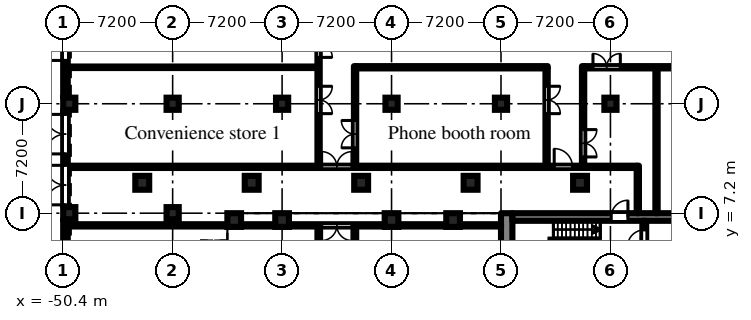
"""IFC4 building model, lengths in metres.
Left out: names, types, materials, properties, quantities, classifications, styles, units other than length and angle.
Written with IfcOpenShell. Run it as: python <this file> out.ifc"""

import sys

from ifc_helpers import new_model, si_unit, direction, frame, frame_2d, origin, origin_2d, place, context, subcontext, project, spatial, rectangle, hollow_circle, extrude, element, fill, save


model = new_model("IFC4")
c1 = context("Model", 3, precision=1e-05, world=origin(), true_north=direction((0.0, 1.0)))
c2 = subcontext(c1, "Body", "Model", "MODEL_VIEW")
j1 = project(units=[si_unit("LENGTHUNIT", "METRE"), si_unit("PLANEANGLEUNIT", "RADIAN")], contexts=[c1])
p1 = place(None, origin())
s1 = spatial("IfcSite", under=j1, at=p1, CompositionType="ELEMENT")
p2 = place(p1, origin())
s2 = spatial("IfcBuilding", under=s1, at=p2, CompositionType="ELEMENT")
p3 = place(p2, origin())
s3 = spatial("IfcBuildingStorey", under=s2, at=p3, CompositionType="ELEMENT", Elevation=0.0)
for number, where, z_axis, x_axis in (
    (1, (-39.15, 6.75, 0.0), (0.0, 0.0, 1.0), (1.0, 0.0, 0.0)),
    (2, (-36.0, 6.75, 0.0), (0.0, 0.0, 1.0), (1.0, 0.0, 0.0)),
    (3, (-28.8, 6.75, 0.0), (0.0, 0.0, 1.0), (1.0, 0.0, 0.0)),
    (4, (-24.75, 6.75, 0.0), (0.0, 0.0, 1.0), (1.0, 0.0, 0.0)),
):
    element("IfcColumn", number, at=place(p3, frame(where, z_axis=z_axis, x_axis=x_axis)), inside=s3, PredefinedType="COLUMN", context=c2, shape_type="SweptSolid", body=[
        extrude(rectangle(XDim=0.9, YDim=0.9, at=origin_2d()), origin(), (0.0, 0.0, 1.0), 7.2),
    ])
for number, where, z_axis, x_axis in (
    (5, (-50.0, 7.2, 0.0), (0.0, 0.0, 1.0), (1.0, 0.0, 0.0)),
    (6, (-50.0, 14.4, 0.0), (0.0, 0.0, 1.0), (1.0, 0.0, 0.0)),
    (7, (-43.2, 7.2, 0.0), (0.0, 0.0, 1.0), (1.0, 0.0, 0.0)),
    (8, (-43.2, 14.4, 0.0), (0.0, 0.0, 1.0), (1.0, 0.0, 0.0)),
    (9, (-36.0, 14.4, 0.0), (0.0, 0.0, 1.0), (1.0, 0.0, 0.0)),
    (10, (-28.8, 14.4, 0.0), (0.0, 0.0, 1.0), (1.0, 0.0, 0.0)),
    (11, (-21.6, 14.4, 0.0), (0.0, 0.0, 1.0), (1.0, 0.0, 0.0)),
    (12, (-14.4, 14.4, 0.0), (0.0, 0.0, 1.0), (1.0, 0.0, 0.0)),
):
    element("IfcColumn", number, at=place(p3, frame(where, z_axis=z_axis, x_axis=x_axis)), inside=s3, PredefinedType="COLUMN", context=c2, shape_type="SweptSolid", body=[
        extrude(rectangle(XDim=0.8, YDim=0.8, at=origin_2d()), origin(), (0.0, 0.0, 1.0), 6.6),
    ])
for number, where, z_axis, x_axis in (
    (13, (-16.4, 9.2, 0.0), (0.0, 0.0, 1.0), (1.0, 0.0, 0.0)),
    (14, (-23.6, 9.2, 0.0), (0.0, 0.0, 1.0), (1.0, 0.0, 0.0)),
    (15, (-30.8, 9.2, 0.0), (0.0, 0.0, 1.0), (1.0, 0.0, 0.0)),
    (16, (-38.0, 9.2, 0.0), (0.0, 0.0, 1.0), (1.0, 0.0, 0.0)),
    (17, (-45.2, 9.2, 0.0), (0.0, 0.0, 1.0), (1.0, 0.0, 0.0)),
):
    element("IfcColumn", number, at=place(p3, frame(where, z_axis=z_axis, x_axis=x_axis)), inside=s3, PredefinedType="COLUMN", context=c2, shape_type="SweptSolid", body=[
        extrude(hollow_circle(Radius=0.457, WallThickness=0.05, at=origin_2d()), origin(), (0.0, 0.0, 1.0), 7.5),
    ])
p4 = place(p3, frame((-50.25, 21.2, 0.0), z_axis=(0.0, 0.0, 1.0), x_axis=(0.0, -1.0, 0.0)))
e18 = element("IfcWall", 18, at=p4, inside=s3, PredefinedType="SOLIDWALL", context=c2, shape_type="SweptSolid", body=[
    extrude(rectangle(XDim=6.4, YDim=0.3, at=frame_2d((3.2, 0.0))), origin(), (0.0, 0.0, 1.0), 6.6),
])
p5 = place(p4, frame((1.35, 0.0, 0.0)))
e19 = element("IfcOpeningElement", 19, at=p5, cuts=e18, PredefinedType="OPENING", context=c2, shape_type="SweptSolid", body=[
    extrude(rectangle(XDim=2.6, YDim=2.4, at=frame_2d((1.3, 1.2))), frame((0.0, 0.16, 0.0), z_axis=(0.0, -1.0, 0.0), x_axis=(1.0, 0.0, 0.0)), (0.0, 0.0, 1.0), 0.32),
])
p6 = place(p3, frame((-50.25, 14.0, 0.0), z_axis=(0.0, 0.0, 1.0), x_axis=(0.0, -1.0, 0.0)))
e20 = element("IfcWall", 20, at=p6, inside=s3, PredefinedType="SOLIDWALL", context=c2, shape_type="SweptSolid", body=[
    extrude(rectangle(XDim=6.4, YDim=0.3, at=frame_2d((3.2, 0.0))), origin(), (0.0, 0.0, 1.0), 6.6),
])
p7 = place(p6, frame((0.3, 0.0, 0.0)))
e21 = element("IfcOpeningElement", 21, at=p7, cuts=e20, PredefinedType="OPENING", context=c2, shape_type="SweptSolid", body=[
    extrude(rectangle(XDim=2.6, YDim=2.4, at=frame_2d((1.3, 1.2))), frame((0.0, 0.16, 0.0), z_axis=(0.0, -1.0, 0.0), x_axis=(1.0, 0.0, 0.0)), (0.0, 0.0, 1.0), 0.32),
])
p8 = place(p6, frame((3.65, 0.0, 0.0)))
e22 = element("IfcOpeningElement", 22, at=p8, cuts=e20, PredefinedType="OPENING", context=c2, shape_type="SweptSolid", body=[
    extrude(rectangle(XDim=2.6, YDim=2.4, at=frame_2d((1.3, 1.2))), frame((0.0, 0.16, 0.0), z_axis=(0.0, -1.0, 0.0), x_axis=(1.0, 0.0, 0.0)), (0.0, 0.0, 1.0), 0.32),
])
p9 = place(p3, frame((-50.25, 6.8, 0.0), z_axis=(0.0, 0.0, 1.0), x_axis=(0.0, -1.0, 0.0)))
e23 = element("IfcWall", 23, at=p9, inside=s3, PredefinedType="SOLIDWALL", context=c2, shape_type="SweptSolid", body=[
    extrude(rectangle(XDim=6.4, YDim=0.3, at=frame_2d((3.2, 0.0))), origin(), (0.0, 0.0, 1.0), 6.6),
])
p10 = place(p9, frame((3.35, 0.0, 0.0)))
e24 = element("IfcOpeningElement", 24, at=p10, cuts=e23, PredefinedType="OPENING", context=c2, shape_type="SweptSolid", body=[
    extrude(rectangle(XDim=2.6, YDim=2.4, at=frame_2d((1.3, 1.2))), frame((0.0, 0.16, 0.0), z_axis=(0.0, -1.0, 0.0), x_axis=(1.0, 0.0, 0.0)), (0.0, 0.0, 1.0), 0.32),
])
p11 = place(p3, frame((-21.225, -7.2, 0.0), z_axis=(0.0, 0.0, 1.0), x_axis=(0.0, 1.0, 0.0)))
e25 = element("IfcWall", 25, at=p11, inside=s3, PredefinedType="SHEAR", context=c2, shape_type="SweptSolid", body=[
    extrude(rectangle(XDim=14.4, YDim=0.75, at=frame_2d((7.2, 0.0))), origin(), (0.0, 0.0, 1.0), 6.6),
])
p12 = place(p11, frame((6.0, 0.0, 0.0)))
e26 = element("IfcOpeningElement", 26, at=p12, cuts=e25, PredefinedType="OPENING", context=c2, shape_type="SweptSolid", body=[
    extrude(rectangle(XDim=2.4, YDim=2.2, at=frame_2d((1.2, 1.1))), frame((0.0, 0.385, 0.0), z_axis=(0.0, -1.0, 0.0), x_axis=(1.0, 0.0, 0.0)), (0.0, 0.0, 1.0), 0.77),
])
p13 = place(p3, frame((-7.9, 6.95, 0.0), z_axis=(0.0, 0.0, 1.0), x_axis=(-1.0, 0.0, 0.0)))
e27 = element("IfcWall", 27, at=p13, inside=s3, PredefinedType="SHEAR", context=c2, shape_type="SweptSolid", body=[
    extrude(rectangle(XDim=12.95, YDim=0.5, at=frame_2d((6.475, 0.0))), origin(), (0.0, 0.0, 1.0), 6.6),
])
p14 = place(p13, frame((5.35, 0.0, 0.0)))
e28 = element("IfcOpeningElement", 28, at=p14, cuts=e27, PredefinedType="OPENING", context=c2, shape_type="SweptSolid", body=[
    extrude(rectangle(XDim=1.1, YDim=2.1, at=frame_2d((0.55, 1.05))), frame((0.0, 0.26, 0.0), z_axis=(0.0, -1.0, 0.0), x_axis=(1.0, 0.0, 0.0)), (0.0, 0.0, 1.0), 0.52),
])
p15 = place(p3, frame((-12.175, 2.05, 0.0), z_axis=(0.0, 0.0, 1.0), x_axis=(0.0, 1.0, 0.0)))
e29 = element("IfcWall", 29, at=p15, inside=s3, PredefinedType="SHEAR", context=c2, shape_type="SweptSolid", body=[
    extrude(rectangle(XDim=4.65, YDim=0.25, at=frame_2d((2.325, 0.0))), origin(), (0.0, 0.0, 1.0), 6.6),
])
p16 = place(p15, frame((2.95, 0.0, 0.0)))
e30 = element("IfcOpeningElement", 30, at=p16, cuts=e29, PredefinedType="OPENING", context=c2, shape_type="SweptSolid", body=[
    extrude(rectangle(XDim=1.1, YDim=2.1, at=frame_2d((0.55, 1.05))), frame((0.0, 0.135, 0.0), z_axis=(0.0, -1.0, 0.0), x_axis=(1.0, 0.0, 0.0)), (0.0, 0.0, 1.0), 0.27),
])
p17 = place(p3, frame((-50.22, 6.4, 0.0), z_axis=(0.0, 0.0, 1.0), x_axis=(1.0, 0.0, 0.0)))
e31 = element("IfcWall", 31, at=p17, inside=s3, PredefinedType="PARTITIONING", context=c2, shape_type="SweptSolid", body=[
    extrude(rectangle(XDim=28.62, YDim=0.15, at=frame_2d((14.31, 0.0))), origin(), (0.0, 0.0, 1.0), 6.6),
])
p18 = place(p17, frame((16.82, 0.0, 0.0)))
e32 = element("IfcOpeningElement", 32, at=p18, cuts=e31, PredefinedType="OPENING", context=c2, shape_type="SweptSolid", body=[
    extrude(rectangle(XDim=2.0, YDim=2.1, at=frame_2d((1.0, 1.05))), frame((0.0, 0.085, 0.0), z_axis=(0.0, -1.0, 0.0), x_axis=(1.0, 0.0, 0.0)), (0.0, 0.0, 1.0), 0.17),
])
p19 = place(p3, frame((-50.22, 10.25, 0.0), z_axis=(0.0, 0.0, 1.0), x_axis=(1.0, 0.0, 0.0)))
e33 = element("IfcWall", 33, at=p19, inside=s3, PredefinedType="PARTITIONING", context=c2, shape_type="SweptSolid", body=[
    extrude(rectangle(XDim=37.545, YDim=0.15, at=frame_2d((18.772, 0.0))), origin(), (0.0, 0.0, 1.0), 6.6),
])
p20 = place(p19, frame((16.82, 0.0, 0.0)))
e34 = element("IfcOpeningElement", 34, at=p20, cuts=e33, PredefinedType="OPENING", context=c2, shape_type="SweptSolid", body=[
    extrude(rectangle(XDim=2.0, YDim=2.1, at=frame_2d((1.0, 1.05))), frame((0.0, 0.085, 0.0), z_axis=(0.0, -1.0, 0.0), x_axis=(1.0, 0.0, 0.0)), (0.0, 0.0, 1.0), 0.17),
])
p21 = place(p19, frame((32.12, 0.0, 0.0)))
e35 = element("IfcOpeningElement", 35, at=p21, cuts=e33, PredefinedType="OPENING", context=c2, shape_type="SweptSolid", body=[
    extrude(rectangle(XDim=1.2, YDim=2.1, at=frame_2d((0.6, 1.05))), frame((0.0, 0.085, 0.0), z_axis=(0.0, -1.0, 0.0), x_axis=(1.0, 0.0, 0.0)), (0.0, 0.0, 1.0), 0.17),
])
p22 = place(p3, frame((-50.22, 16.8, 0.0), z_axis=(0.0, 0.0, 1.0), x_axis=(1.0, 0.0, 0.0)))
e36 = element("IfcWall", 36, at=p22, inside=s3, PredefinedType="PARTITIONING", context=c2, shape_type="SweptSolid", body=[
    extrude(rectangle(XDim=16.545, YDim=0.1, at=frame_2d((8.272, 0.0))), origin(), (0.0, 0.0, 1.0), 6.6),
])
p23 = place(p3, frame((-33.6, 1.5, 0.0), z_axis=(0.0, 0.0, 1.0), x_axis=(0.0, 1.0, 0.0)))
e37 = element("IfcWall", 37, at=p23, inside=s3, PredefinedType="PARTITIONING", context=c2, shape_type="SweptSolid", body=[
    extrude(rectangle(XDim=4.825, YDim=0.15, at=frame_2d((2.413, 0.0))), origin(), (0.0, 0.0, 1.0), 6.6),
])
p24 = place(p23, frame((0.65, 0.0, 0.0)))
e38 = element("IfcOpeningElement", 38, at=p24, cuts=e37, PredefinedType="OPENING", context=c2, shape_type="SweptSolid", body=[
    extrude(rectangle(XDim=1.8, YDim=2.1, at=frame_2d((0.9, 1.05))), frame((0.0, 0.085, 0.0), z_axis=(0.0, -1.0, 0.0), x_axis=(1.0, 0.0, 0.0)), (0.0, 0.0, 1.0), 0.17),
])
p25 = place(p3, frame((-33.6, 10.325, 0.0), z_axis=(0.0, 0.0, 1.0), x_axis=(0.0, 1.0, 0.0)))
e39 = element("IfcWall", 39, at=p25, inside=s3, PredefinedType="PARTITIONING", context=c2, shape_type="SweptSolid", body=[
    extrude(rectangle(XDim=20.8, YDim=0.15, at=frame_2d((10.4, 0.0))), origin(), (0.0, 0.0, 1.0), 6.6),
])
p26 = place(p25, frame((3.425, 0.0, 0.0)))
e40 = element("IfcOpeningElement", 40, at=p26, cuts=e39, PredefinedType="OPENING", context=c2, shape_type="SweptSolid", body=[
    extrude(rectangle(XDim=1.8, YDim=2.1, at=frame_2d((0.9, 1.05))), frame((0.0, 0.085, 0.0), z_axis=(0.0, -1.0, 0.0), x_axis=(1.0, 0.0, 0.0)), (0.0, 0.0, 1.0), 0.17),
])
p27 = place(p25, frame((7.125, 0.0, 0.0)))
e41 = element("IfcOpeningElement", 41, at=p27, cuts=e39, PredefinedType="OPENING", context=c2, shape_type="SweptSolid", body=[
    extrude(rectangle(XDim=1.8, YDim=2.1, at=frame_2d((0.9, 1.05))), frame((0.0, 0.085, 0.0), z_axis=(0.0, -1.0, 0.0), x_axis=(1.0, 0.0, 0.0)), (0.0, 0.0, 1.0), 0.17),
])
p28 = place(p3, frame((-31.2, -6.325, 0.0), z_axis=(0.0, 0.0, 1.0), x_axis=(0.0, 1.0, 0.0)))
e42 = element("IfcWall", 42, at=p28, inside=s3, PredefinedType="PARTITIONING", context=c2, shape_type="SweptSolid", body=[
    extrude(rectangle(XDim=12.65, YDim=0.15, at=frame_2d((6.325, 0.0))), origin(), (0.0, 0.0, 1.0), 6.6),
])
p29 = place(p28, frame((5.325, 0.0, 0.0)))
e43 = element("IfcOpeningElement", 43, at=p29, cuts=e42, PredefinedType="OPENING", context=c2, shape_type="SweptSolid", body=[
    extrude(rectangle(XDim=2.0, YDim=2.1, at=frame_2d((1.0, 1.05))), frame((0.0, 0.085, 0.0), z_axis=(0.0, -1.0, 0.0), x_axis=(1.0, 0.0, 0.0)), (0.0, 0.0, 1.0), 0.17),
])
p30 = place(p28, frame((8.175, 0.0, 0.0)))
e44 = element("IfcOpeningElement", 44, at=p30, cuts=e42, PredefinedType="OPENING", context=c2, shape_type="SweptSolid", body=[
    extrude(rectangle(XDim=1.8, YDim=2.1, at=frame_2d((0.9, 1.05))), frame((0.0, 0.085, 0.0), z_axis=(0.0, -1.0, 0.0), x_axis=(1.0, 0.0, 0.0)), (0.0, 0.0, 1.0), 0.17),
])
p31 = place(p28, frame((0.575, 0.0, 0.0)))
e45 = element("IfcOpeningElement", 45, at=p31, cuts=e42, PredefinedType="OPENING", context=c2, shape_type="SweptSolid", body=[
    extrude(rectangle(XDim=1.2, YDim=2.1, at=frame_2d((0.6, 1.05))), frame((0.0, 0.085, 0.0), z_axis=(0.0, -1.0, 0.0), x_axis=(1.0, 0.0, 0.0)), (0.0, 0.0, 1.0), 0.17),
])
p32 = place(p3, frame((-31.2, 10.325, 0.0), z_axis=(0.0, 0.0, 1.0), x_axis=(0.0, 1.0, 0.0)))
e46 = element("IfcWall", 46, at=p32, inside=s3, PredefinedType="PARTITIONING", context=c2, shape_type="SweptSolid", body=[
    extrude(rectangle(XDim=6.55, YDim=0.15, at=frame_2d((3.275, 0.0))), origin(), (0.0, 0.0, 1.0), 6.6),
])
p33 = place(p32, frame((1.175, 0.0, 0.0)))
e47 = element("IfcOpeningElement", 47, at=p33, cuts=e46, PredefinedType="OPENING", context=c2, shape_type="SweptSolid", body=[
    extrude(rectangle(XDim=1.8, YDim=2.1, at=frame_2d((0.9, 1.05))), frame((0.0, 0.085, 0.0), z_axis=(0.0, -1.0, 0.0), x_axis=(1.0, 0.0, 0.0)), (0.0, 0.0, 1.0), 0.17),
])
p34 = place(p3, frame((-31.125, 16.8, 0.0), z_axis=(0.0, 0.0, 1.0), x_axis=(1.0, 0.0, 0.0)))
e48 = element("IfcWall", 48, at=p34, inside=s3, PredefinedType="PARTITIONING", context=c2, shape_type="SweptSolid", body=[
    extrude(rectangle(XDim=12.6, YDim=0.15, at=frame_2d((6.3, 0.0))), origin(), (0.0, 0.0, 1.0), 6.6),
])
p35 = place(p3, frame((-18.6, 10.325, 0.0), z_axis=(0.0, 0.0, 1.0), x_axis=(0.0, 1.0, 0.0)))
e49 = element("IfcWall", 49, at=p35, inside=s3, PredefinedType="PARTITIONING", context=c2, shape_type="SweptSolid", body=[
    extrude(rectangle(XDim=6.4, YDim=0.15, at=frame_2d((3.2, 0.0))), origin(), (0.0, 0.0, 1.0), 6.6),
])
p36 = place(p35, frame((3.425, 0.0, 0.0)))
e50 = element("IfcOpeningElement", 50, at=p36, cuts=e49, PredefinedType="OPENING", context=c2, shape_type="SweptSolid", body=[
    extrude(rectangle(XDim=1.8, YDim=2.1, at=frame_2d((0.9, 1.05))), frame((0.0, 0.085, 0.0), z_axis=(0.0, -1.0, 0.0), x_axis=(1.0, 0.0, 0.0)), (0.0, 0.0, 1.0), 0.17),
])
p37 = place(p3, frame((-16.2, 10.325, 0.0), z_axis=(0.0, 0.0, 1.0), x_axis=(0.0, 1.0, 0.0)))
e51 = element("IfcWall", 51, at=p37, inside=s3, PredefinedType="PARTITIONING", context=c2, shape_type="SweptSolid", body=[
    extrude(rectangle(XDim=6.55, YDim=0.15, at=frame_2d((3.275, 0.0))), origin(), (0.0, 0.0, 1.0), 6.6),
])
p38 = place(p37, frame((0.575, 0.0, 0.0)))
e52 = element("IfcOpeningElement", 52, at=p38, cuts=e51, PredefinedType="OPENING", context=c2, shape_type="SweptSolid", body=[
    extrude(rectangle(XDim=1.8, YDim=2.1, at=frame_2d((0.9, 1.05))), frame((0.0, 0.085, 0.0), z_axis=(0.0, -1.0, 0.0), x_axis=(1.0, 0.0, 0.0)), (0.0, 0.0, 1.0), 0.17),
])
p39 = place(p3, frame((-16.125, 16.8, 0.0), z_axis=(0.0, 0.0, 1.0), x_axis=(1.0, 0.0, 0.0)))
e53 = element("IfcWall", 53, at=p39, inside=s3, PredefinedType="PARTITIONING", context=c2, shape_type="SweptSolid", body=[
    extrude(rectangle(XDim=6.604, YDim=0.15, at=frame_2d((3.302, 0.0))), origin(), (0.0, 0.0, 1.0), 6.6),
])
p40 = place(p39, frame((0.575, 0.0, 0.0)))
e54 = element("IfcOpeningElement", 54, at=p40, cuts=e53, PredefinedType="OPENING", context=c2, shape_type="SweptSolid", body=[
    extrude(rectangle(XDim=1.8, YDim=2.1, at=frame_2d((0.9, 1.05))), frame((0.0, 0.085, 0.0), z_axis=(0.0, -1.0, 0.0), x_axis=(1.0, 0.0, 0.0)), (0.0, 0.0, 1.0), 0.17),
])
p41 = place(p3, frame((-12.6, 7.2, 0.0), z_axis=(0.0, 0.0, 1.0), x_axis=(0.0, 1.0, 0.0)))
e55 = element("IfcWall", 55, at=p41, inside=s3, PredefinedType="PARTITIONING", context=c2, shape_type="SweptSolid", body=[
    extrude(rectangle(XDim=3.125, YDim=0.15, at=frame_2d((1.562, 0.0))), origin(), (0.0, 0.0, 1.0), 6.6),
])
p42 = place(p3, frame((-11.37, 7.2, 0.0), z_axis=(0.0, 0.0, 1.0), x_axis=(0.0, 1.0, 0.0)))
e56 = element("IfcWall", 56, at=p42, inside=s3, PredefinedType="PARTITIONING", context=c2, shape_type="SweptSolid", body=[
    extrude(rectangle(XDim=9.525, YDim=0.15, at=frame_2d((4.763, 0.0))), origin(), (0.0, 0.0, 1.0), 6.6),
])
p43 = place(p5, frame((2.6, 0.0, 0.0), z_axis=(0.0, 0.0, 1.0), x_axis=(-1.0, 0.0, 0.0)))
e57 = element("IfcDoor", 57, at=p43, inside=s3, OperationType="DOUBLE_DOOR_DOUBLE_SWING", PredefinedType="DOOR", context=c2, shape_type="SweptSolid", body=[
    extrude(rectangle(XDim=2.6, YDim=2.4, at=frame_2d((1.3, 1.2))), frame((0.0, 0.025, 0.0), z_axis=(0.0, -1.0, 0.0), x_axis=(1.0, 0.0, 0.0)), (0.0, 0.0, 1.0), 0.05),
])
fill(e19, e57)
p44 = place(p7, frame((2.6, 0.0, 0.0), z_axis=(0.0, 0.0, 1.0), x_axis=(-1.0, 0.0, 0.0)))
e58 = element("IfcDoor", 58, at=p44, inside=s3, OperationType="DOUBLE_DOOR_DOUBLE_SWING", PredefinedType="DOOR", context=c2, shape_type="SweptSolid", body=[
    extrude(rectangle(XDim=2.6, YDim=2.4, at=frame_2d((1.3, 1.2))), frame((0.0, 0.025, 0.0), z_axis=(0.0, -1.0, 0.0), x_axis=(1.0, 0.0, 0.0)), (0.0, 0.0, 1.0), 0.05),
])
fill(e21, e58)
p45 = place(p8, frame((2.6, 0.0, 0.0), z_axis=(0.0, 0.0, 1.0), x_axis=(-1.0, 0.0, 0.0)))
e59 = element("IfcDoor", 59, at=p45, inside=s3, OperationType="DOUBLE_DOOR_DOUBLE_SWING", PredefinedType="DOOR", context=c2, shape_type="SweptSolid", body=[
    extrude(rectangle(XDim=2.6, YDim=2.4, at=frame_2d((1.3, 1.2))), frame((0.0, 0.025, 0.0), z_axis=(0.0, -1.0, 0.0), x_axis=(1.0, 0.0, 0.0)), (0.0, 0.0, 1.0), 0.05),
])
fill(e22, e59)
p46 = place(p16, origin())
e60 = element("IfcDoor", 60, at=p46, inside=s3, OperationType="SINGLE_SWING_LEFT", PredefinedType="DOOR", context=c2, shape_type="SweptSolid", body=[
    extrude(rectangle(XDim=1.1, YDim=2.1, at=frame_2d((0.55, 1.05))), frame((0.0, 0.025, 0.0), z_axis=(0.0, -1.0, 0.0), x_axis=(1.0, 0.0, 0.0)), (0.0, 0.0, 1.0), 0.05),
])
fill(e30, e60)
p47 = place(p14, frame((1.1, 0.0, 0.0), z_axis=(0.0, 0.0, 1.0), x_axis=(-1.0, 0.0, 0.0)))
e61 = element("IfcDoor", 61, at=p47, inside=s3, OperationType="SINGLE_SWING_RIGHT", PredefinedType="DOOR", context=c2, shape_type="SweptSolid", body=[
    extrude(rectangle(XDim=1.1, YDim=2.1, at=frame_2d((0.55, 1.05))), frame((0.0, 0.025, 0.0), z_axis=(0.0, -1.0, 0.0), x_axis=(1.0, 0.0, 0.0)), (0.0, 0.0, 1.0), 0.05),
])
fill(e28, e61)
p48 = place(p18, frame((2.0, 0.0, 0.0), z_axis=(0.0, 0.0, 1.0), x_axis=(-1.0, 0.0, 0.0)))
e62 = element("IfcDoor", 62, at=p48, inside=s3, OperationType="DOUBLE_DOOR_DOUBLE_SWING", PredefinedType="DOOR", context=c2, shape_type="SweptSolid", body=[
    extrude(rectangle(XDim=2.0, YDim=2.1, at=frame_2d((1.0, 1.05))), frame((0.0, 0.025, 0.0), z_axis=(0.0, -1.0, 0.0), x_axis=(1.0, 0.0, 0.0)), (0.0, 0.0, 1.0), 0.05),
])
fill(e32, e62)
p49 = place(p20, origin())
e63 = element("IfcDoor", 63, at=p49, inside=s3, OperationType="DOUBLE_DOOR_DOUBLE_SWING", PredefinedType="DOOR", context=c2, shape_type="SweptSolid", body=[
    extrude(rectangle(XDim=2.0, YDim=2.1, at=frame_2d((1.0, 1.05))), frame((0.0, 0.025, 0.0), z_axis=(0.0, -1.0, 0.0), x_axis=(1.0, 0.0, 0.0)), (0.0, 0.0, 1.0), 0.05),
])
fill(e34, e63)
p50 = place(p21, origin())
e64 = element("IfcDoor", 64, at=p50, inside=s3, OperationType="SINGLE_SWING_LEFT", PredefinedType="DOOR", context=c2, shape_type="SweptSolid", body=[
    extrude(rectangle(XDim=1.2, YDim=2.1, at=frame_2d((0.6, 1.05))), frame((0.0, 0.025, 0.0), z_axis=(0.0, -1.0, 0.0), x_axis=(1.0, 0.0, 0.0)), (0.0, 0.0, 1.0), 0.05),
])
fill(e35, e64)
p51 = place(p38, frame((1.8, 0.0, 0.0), z_axis=(0.0, 0.0, 1.0), x_axis=(-1.0, 0.0, 0.0)))
e65 = element("IfcDoor", 65, at=p51, inside=s3, OperationType="DOUBLE_DOOR_DOUBLE_SWING", PredefinedType="DOOR", context=c2, shape_type="SweptSolid", body=[
    extrude(rectangle(XDim=1.8, YDim=2.1, at=frame_2d((0.9, 1.05))), frame((0.0, 0.025, 0.0), z_axis=(0.0, -1.0, 0.0), x_axis=(1.0, 0.0, 0.0)), (0.0, 0.0, 1.0), 0.05),
])
fill(e52, e65)
p52 = place(p40, origin())
e66 = element("IfcDoor", 66, at=p52, inside=s3, OperationType="DOUBLE_DOOR_DOUBLE_SWING", PredefinedType="DOOR", context=c2, shape_type="SweptSolid", body=[
    extrude(rectangle(XDim=1.8, YDim=2.1, at=frame_2d((0.9, 1.05))), frame((0.0, 0.025, 0.0), z_axis=(0.0, -1.0, 0.0), x_axis=(1.0, 0.0, 0.0)), (0.0, 0.0, 1.0), 0.05),
])
fill(e54, e66)
p53 = place(p33, origin())
e67 = element("IfcDoor", 67, at=p53, inside=s3, OperationType="DOUBLE_DOOR_DOUBLE_SWING", PredefinedType="DOOR", context=c2, shape_type="SweptSolid", body=[
    extrude(rectangle(XDim=1.8, YDim=2.1, at=frame_2d((0.9, 1.05))), frame((0.0, 0.025, 0.0), z_axis=(0.0, -1.0, 0.0), x_axis=(1.0, 0.0, 0.0)), (0.0, 0.0, 1.0), 0.05),
])
fill(e47, e67)
p54 = place(p36, frame((1.8, 0.0, 0.0), z_axis=(0.0, 0.0, 1.0), x_axis=(-1.0, 0.0, 0.0)))
e68 = element("IfcDoor", 68, at=p54, inside=s3, OperationType="DOUBLE_DOOR_DOUBLE_SWING", PredefinedType="DOOR", context=c2, shape_type="SweptSolid", body=[
    extrude(rectangle(XDim=1.8, YDim=2.1, at=frame_2d((0.9, 1.05))), frame((0.0, 0.025, 0.0), z_axis=(0.0, -1.0, 0.0), x_axis=(1.0, 0.0, 0.0)), (0.0, 0.0, 1.0), 0.05),
])
fill(e50, e68)
p55 = place(p26, frame((1.8, 0.0, 0.0), z_axis=(0.0, 0.0, 1.0), x_axis=(-1.0, 0.0, 0.0)))
e69 = element("IfcDoor", 69, at=p55, inside=s3, OperationType="DOUBLE_DOOR_DOUBLE_SWING", PredefinedType="DOOR", context=c2, shape_type="SweptSolid", body=[
    extrude(rectangle(XDim=1.8, YDim=2.1, at=frame_2d((0.9, 1.05))), frame((0.0, 0.025, 0.0), z_axis=(0.0, -1.0, 0.0), x_axis=(1.0, 0.0, 0.0)), (0.0, 0.0, 1.0), 0.05),
])
fill(e40, e69)
p56 = place(p27, frame((1.8, 0.0, 0.0), z_axis=(0.0, 0.0, 1.0), x_axis=(-1.0, 0.0, 0.0)))
e70 = element("IfcDoor", 70, at=p56, inside=s3, OperationType="DOUBLE_DOOR_DOUBLE_SWING", PredefinedType="DOOR", context=c2, shape_type="SweptSolid", body=[
    extrude(rectangle(XDim=1.8, YDim=2.1, at=frame_2d((0.9, 1.05))), frame((0.0, 0.025, 0.0), z_axis=(0.0, -1.0, 0.0), x_axis=(1.0, 0.0, 0.0)), (0.0, 0.0, 1.0), 0.05),
])
fill(e41, e70)
save(model, sys.argv[1])
